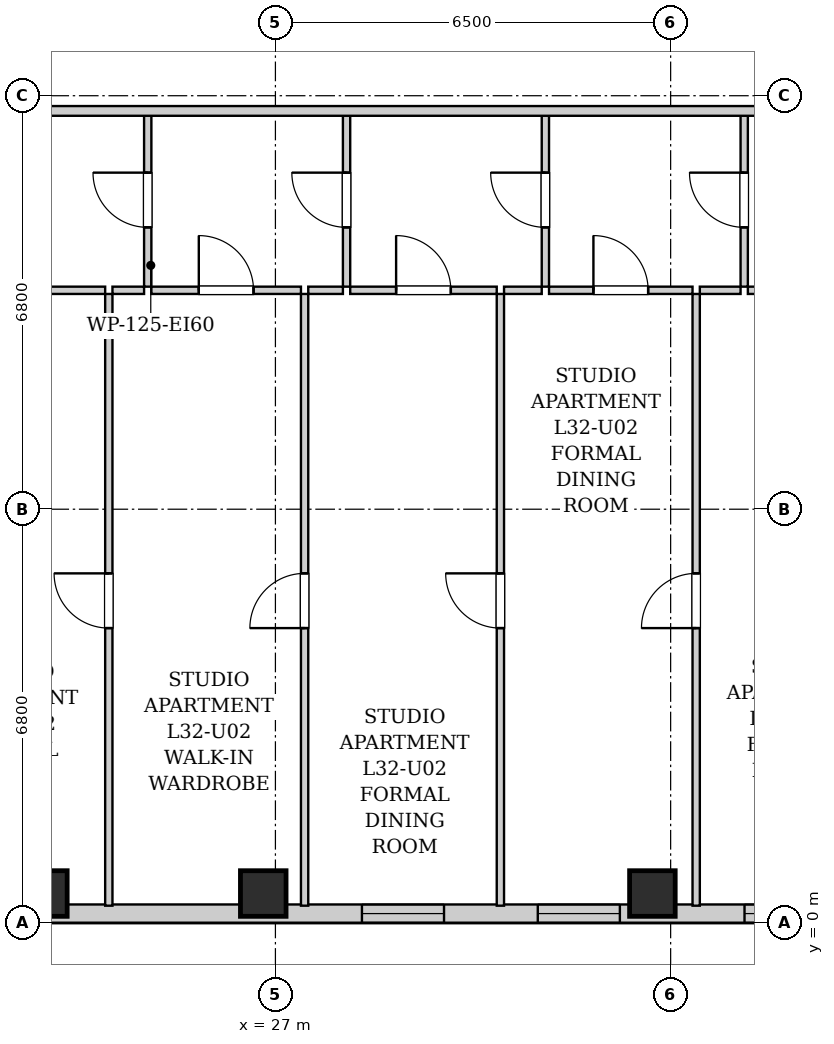
"""IFC4 building model, lengths in metres.
Left out: names, types, materials, properties, quantities, classifications, styles, units other than length and angle.
Written with IfcOpenShell. Run it as: python <this file> out.ifc"""

import sys

from ifc_helpers import new_model, si_unit, direction, frame, frame_2d, origin, origin_2d, place, context, subcontext, project, spatial, rectangle, extrude, element, fill, save


model = new_model("IFC4")
c1 = context("Model", 3, precision=1e-05, world=origin(), true_north=direction((0.0, 1.0)))
c2 = subcontext(c1, "Body", "Model", "MODEL_VIEW")
j1 = project(units=[si_unit("LENGTHUNIT", "METRE"), si_unit("PLANEANGLEUNIT", "RADIAN")], contexts=[c1])
p1 = place(None, origin())
s1 = spatial("IfcSite", under=j1, at=p1, CompositionType="ELEMENT")
p2 = place(p1, origin())
s2 = spatial("IfcBuilding", under=s1, at=p2, CompositionType="ELEMENT")
p3 = place(p2, frame((0.0, 0.0, 113.5)))
s3 = spatial("IfcBuildingStorey", under=s2, at=p3, CompositionType="ELEMENT", Elevation=113.5)
for number, where, z_axis, x_axis in (
    (1, (23.2, 0.48, 0.0), (0.0, 0.0, 1.0), (1.0, 0.0, 0.0)),
    (2, (26.8, 0.48, 0.0), (0.0, 0.0, 1.0), (1.0, 0.0, 0.0)),
    (3, (33.2, 0.48, 0.0), (0.0, 0.0, 1.0), (1.0, 0.0, 0.0)),
):
    element("IfcColumn", number, at=place(p3, frame(where, z_axis=z_axis, x_axis=x_axis)), inside=s3, PredefinedType="COLUMN", context=c2, shape_type="SweptSolid", body=[
        extrude(rectangle(XDim=0.75, YDim=0.75, at=origin_2d()), origin(), (0.0, 0.0, 1.0), 3.2),
    ])
p4 = place(p3, frame((40.9, 0.15, 0.0), z_axis=(0.0, 0.0, 1.0), x_axis=(-1.0, 0.0, 0.0)))
e4 = element("IfcWall", 4, at=p4, inside=s3, PredefinedType="SOLIDWALL", context=c2, shape_type="SweptSolid", body=[
    extrude(rectangle(XDim=21.95, YDim=0.3, at=frame_2d((10.975, 0.0))), origin(), (0.0, 0.0, 1.0), 2.94),
])
p5 = place(p4, frame((20.08, 0.0, 0.55)))
e5 = element("IfcOpeningElement", 5, at=p5, cuts=e4, PredefinedType="OPENING", context=c2, shape_type="SweptSolid", body=[
    extrude(rectangle(XDim=1.35, YDim=1.2, at=frame_2d((0.675, 0.6))), frame((0.0, 0.16, 0.0), z_axis=(0.0, -1.0, 0.0), x_axis=(1.0, 0.0, 0.0)), (0.0, 0.0, 1.0), 0.32),
])
p6 = place(p4, frame((18.4, 0.0, 0.55)))
e6 = element("IfcOpeningElement", 6, at=p6, cuts=e4, PredefinedType="OPENING", context=c2, shape_type="SweptSolid", body=[
    extrude(rectangle(XDim=0.85, YDim=1.2, at=frame_2d((0.425, 0.6))), frame((0.0, 0.16, 0.0), z_axis=(0.0, -1.0, 0.0), x_axis=(1.0, 0.0, 0.0)), (0.0, 0.0, 1.0), 0.32),
])
p7 = place(p4, frame((11.127, 0.0, 0.55)))
e7 = element("IfcOpeningElement", 7, at=p7, cuts=e4, PredefinedType="OPENING", context=c2, shape_type="SweptSolid", body=[
    extrude(rectangle(XDim=1.35, YDim=1.2, at=frame_2d((0.675, 0.6))), frame((0.0, 0.16, 0.0), z_axis=(0.0, -1.0, 0.0), x_axis=(1.0, 0.0, 0.0)), (0.0, 0.0, 1.0), 0.32),
])
p8 = place(p4, frame((8.235, 0.0, 0.55)))
e8 = element("IfcOpeningElement", 8, at=p8, cuts=e4, PredefinedType="OPENING", context=c2, shape_type="SweptSolid", body=[
    extrude(rectangle(XDim=1.35, YDim=1.2, at=frame_2d((0.675, 0.6))), frame((0.0, 0.16, 0.0), z_axis=(0.0, -1.0, 0.0), x_axis=(1.0, 0.0, 0.0)), (0.0, 0.0, 1.0), 0.32),
])
p9 = place(p4, frame((4.835, 0.0, 0.55)))
e9 = element("IfcOpeningElement", 9, at=p9, cuts=e4, PredefinedType="OPENING", context=c2, shape_type="SweptSolid", body=[
    extrude(rectangle(XDim=1.35, YDim=1.2, at=frame_2d((0.675, 0.6))), frame((0.0, 0.16, 0.0), z_axis=(0.0, -1.0, 0.0), x_axis=(1.0, 0.0, 0.0)), (0.0, 0.0, 1.0), 0.32),
])
p10 = place(p3, frame((24.9, 10.46, 0.0), z_axis=(0.0, 0.0, 1.0), x_axis=(0.0, 1.0, 0.0)))
e10 = element("IfcWall", 10, at=p10, inside=s3, PredefinedType="PARTITIONING", context=c2, shape_type="SweptSolid", body=[
    extrude(rectangle(XDim=2.85, YDim=0.12, at=frame_2d((1.425, 0.0))), origin(), (0.0, 0.0, 1.0), 2.94),
])
p11 = place(p10, frame((0.975, 0.0, 0.0)))
e11 = element("IfcOpeningElement", 11, at=p11, cuts=e10, PredefinedType="OPENING", context=c2, shape_type="SweptSolid", body=[
    extrude(rectangle(XDim=0.9, YDim=2.05, at=frame_2d((0.45, 1.025))), frame((0.0, 0.07, 0.0), z_axis=(0.0, -1.0, 0.0), x_axis=(1.0, 0.0, 0.0)), (0.0, 0.0, 1.0), 0.14),
])
p12 = place(p3, frame((21.1, 10.4, 0.0), z_axis=(0.0, 0.0, 1.0), x_axis=(1.0, 0.0, 0.0)))
e12 = element("IfcWall", 12, at=p12, inside=s3, PredefinedType="PARTITIONING", context=c2, shape_type="SweptSolid", body=[
    extrude(rectangle(XDim=3.1, YDim=0.12, at=frame_2d((1.55, 0.0))), origin(), (0.0, 0.0, 1.0), 2.94),
])
p13 = place(p12, frame((1.1, 0.0, 0.0)))
e13 = element("IfcOpeningElement", 13, at=p13, cuts=e12, PredefinedType="OPENING", context=c2, shape_type="SweptSolid", body=[
    extrude(rectangle(XDim=0.9, YDim=2.05, at=frame_2d((0.45, 1.025))), frame((0.0, 0.07, 0.0), z_axis=(0.0, -1.0, 0.0), x_axis=(1.0, 0.0, 0.0)), (0.0, 0.0, 1.0), 0.14),
])
p14 = place(p3, frame((24.32, 10.4, 0.0), z_axis=(0.0, 0.0, 1.0), x_axis=(1.0, 0.0, 0.0)))
e14 = element("IfcWall", 14, at=p14, inside=s3, PredefinedType="PARTITIONING", context=c2, shape_type="SweptSolid", body=[
    extrude(rectangle(XDim=0.52, YDim=0.12, at=frame_2d((0.26, 0.0))), origin(), (0.0, 0.0, 1.0), 2.94),
])
p15 = place(p3, frame((28.17, 10.46, 0.0), z_axis=(0.0, 0.0, 1.0), x_axis=(0.0, 1.0, 0.0)))
e15 = element("IfcWall", 15, at=p15, inside=s3, PredefinedType="PARTITIONING", context=c2, shape_type="SweptSolid", body=[
    extrude(rectangle(XDim=2.85, YDim=0.12, at=frame_2d((1.425, 0.0))), origin(), (0.0, 0.0, 1.0), 2.94),
])
p16 = place(p15, frame((0.975, 0.0, 0.0)))
e16 = element("IfcOpeningElement", 16, at=p16, cuts=e15, PredefinedType="OPENING", context=c2, shape_type="SweptSolid", body=[
    extrude(rectangle(XDim=0.9, YDim=2.05, at=frame_2d((0.45, 1.025))), frame((0.0, 0.07, 0.0), z_axis=(0.0, -1.0, 0.0), x_axis=(1.0, 0.0, 0.0)), (0.0, 0.0, 1.0), 0.14),
])
p17 = place(p3, frame((24.96, 10.4, 0.0), z_axis=(0.0, 0.0, 1.0), x_axis=(1.0, 0.0, 0.0)))
e17 = element("IfcWall", 17, at=p17, inside=s3, PredefinedType="PARTITIONING", context=c2, shape_type="SweptSolid", body=[
    extrude(rectangle(XDim=2.46, YDim=0.12, at=frame_2d((1.23, 0.0))), origin(), (0.0, 0.0, 1.0), 2.94),
])
p18 = place(p17, frame((0.78, 0.0, 0.0)))
e18 = element("IfcOpeningElement", 18, at=p18, cuts=e17, PredefinedType="OPENING", context=c2, shape_type="SweptSolid", body=[
    extrude(rectangle(XDim=0.9, YDim=2.05, at=frame_2d((0.45, 1.025))), frame((0.0, 0.07, 0.0), z_axis=(0.0, -1.0, 0.0), x_axis=(1.0, 0.0, 0.0)), (0.0, 0.0, 1.0), 0.14),
])
p19 = place(p3, frame((27.54, 10.4, 0.0), z_axis=(0.0, 0.0, 1.0), x_axis=(1.0, 0.0, 0.0)))
e19 = element("IfcWall", 19, at=p19, inside=s3, PredefinedType="PARTITIONING", context=c2, shape_type="SweptSolid", body=[
    extrude(rectangle(XDim=0.57, YDim=0.12, at=frame_2d((0.285, 0.0))), origin(), (0.0, 0.0, 1.0), 2.94),
])
p20 = place(p3, frame((31.44, 10.46, 0.0), z_axis=(0.0, 0.0, 1.0), x_axis=(0.0, 1.0, 0.0)))
e20 = element("IfcWall", 20, at=p20, inside=s3, PredefinedType="PARTITIONING", context=c2, shape_type="SweptSolid", body=[
    extrude(rectangle(XDim=2.85, YDim=0.12, at=frame_2d((1.425, 0.0))), origin(), (0.0, 0.0, 1.0), 2.94),
])
p21 = place(p20, frame((0.975, 0.0, 0.0)))
e21 = element("IfcOpeningElement", 21, at=p21, cuts=e20, PredefinedType="OPENING", context=c2, shape_type="SweptSolid", body=[
    extrude(rectangle(XDim=0.9, YDim=2.05, at=frame_2d((0.45, 1.025))), frame((0.0, 0.07, 0.0), z_axis=(0.0, -1.0, 0.0), x_axis=(1.0, 0.0, 0.0)), (0.0, 0.0, 1.0), 0.14),
])
p22 = place(p3, frame((28.23, 10.4, 0.0), z_axis=(0.0, 0.0, 1.0), x_axis=(1.0, 0.0, 0.0)))
e22 = element("IfcWall", 22, at=p22, inside=s3, PredefinedType="PARTITIONING", context=c2, shape_type="SweptSolid", body=[
    extrude(rectangle(XDim=2.41, YDim=0.12, at=frame_2d((1.205, 0.0))), origin(), (0.0, 0.0, 1.0), 2.94),
])
p23 = place(p22, frame((0.755, 0.0, 0.0)))
e23 = element("IfcOpeningElement", 23, at=p23, cuts=e22, PredefinedType="OPENING", context=c2, shape_type="SweptSolid", body=[
    extrude(rectangle(XDim=0.9, YDim=2.05, at=frame_2d((0.45, 1.025))), frame((0.0, 0.07, 0.0), z_axis=(0.0, -1.0, 0.0), x_axis=(1.0, 0.0, 0.0)), (0.0, 0.0, 1.0), 0.14),
])
p24 = place(p3, frame((30.76, 10.4, 0.0), z_axis=(0.0, 0.0, 1.0), x_axis=(1.0, 0.0, 0.0)))
e24 = element("IfcWall", 24, at=p24, inside=s3, PredefinedType="PARTITIONING", context=c2, shape_type="SweptSolid", body=[
    extrude(rectangle(XDim=0.62, YDim=0.12, at=frame_2d((0.31, 0.0))), origin(), (0.0, 0.0, 1.0), 2.94),
])
p25 = place(p3, frame((34.71, 10.46, 0.0), z_axis=(0.0, 0.0, 1.0), x_axis=(0.0, 1.0, 0.0)))
e25 = element("IfcWall", 25, at=p25, inside=s3, PredefinedType="PARTITIONING", context=c2, shape_type="SweptSolid", body=[
    extrude(rectangle(XDim=2.85, YDim=0.12, at=frame_2d((1.425, 0.0))), origin(), (0.0, 0.0, 1.0), 2.94),
])
p26 = place(p25, frame((0.975, 0.0, 0.0)))
e26 = element("IfcOpeningElement", 26, at=p26, cuts=e25, PredefinedType="OPENING", context=c2, shape_type="SweptSolid", body=[
    extrude(rectangle(XDim=0.9, YDim=2.05, at=frame_2d((0.45, 1.025))), frame((0.0, 0.07, 0.0), z_axis=(0.0, -1.0, 0.0), x_axis=(1.0, 0.0, 0.0)), (0.0, 0.0, 1.0), 0.14),
])
p27 = place(p3, frame((31.5, 10.4, 0.0), z_axis=(0.0, 0.0, 1.0), x_axis=(1.0, 0.0, 0.0)))
e27 = element("IfcWall", 27, at=p27, inside=s3, PredefinedType="PARTITIONING", context=c2, shape_type="SweptSolid", body=[
    extrude(rectangle(XDim=2.36, YDim=0.12, at=frame_2d((1.18, 0.0))), origin(), (0.0, 0.0, 1.0), 2.94),
])
p28 = place(p27, frame((0.73, 0.0, 0.0)))
e28 = element("IfcOpeningElement", 28, at=p28, cuts=e27, PredefinedType="OPENING", context=c2, shape_type="SweptSolid", body=[
    extrude(rectangle(XDim=0.9, YDim=2.05, at=frame_2d((0.45, 1.025))), frame((0.0, 0.07, 0.0), z_axis=(0.0, -1.0, 0.0), x_axis=(1.0, 0.0, 0.0)), (0.0, 0.0, 1.0), 0.14),
])
p29 = place(p3, frame((33.98, 10.4, 0.0), z_axis=(0.0, 0.0, 1.0), x_axis=(1.0, 0.0, 0.0)))
e29 = element("IfcWall", 29, at=p29, inside=s3, PredefinedType="PARTITIONING", context=c2, shape_type="SweptSolid", body=[
    extrude(rectangle(XDim=0.67, YDim=0.12, at=frame_2d((0.335, 0.0))), origin(), (0.0, 0.0, 1.0), 2.94),
])
p30 = place(p3, frame((34.77, 10.4, 0.0), z_axis=(0.0, 0.0, 1.0), x_axis=(1.0, 0.0, 0.0)))
e30 = element("IfcWall", 30, at=p30, inside=s3, PredefinedType="PARTITIONING", context=c2, shape_type="SweptSolid", body=[
    extrude(rectangle(XDim=2.31, YDim=0.12, at=frame_2d((1.155, 0.0))), origin(), (0.0, 0.0, 1.0), 2.94),
])
p31 = place(p30, frame((0.705, 0.0, 0.0)))
e31 = element("IfcOpeningElement", 31, at=p31, cuts=e30, PredefinedType="OPENING", context=c2, shape_type="SweptSolid", body=[
    extrude(rectangle(XDim=0.9, YDim=2.05, at=frame_2d((0.45, 1.025))), frame((0.0, 0.07, 0.0), z_axis=(0.0, -1.0, 0.0), x_axis=(1.0, 0.0, 0.0)), (0.0, 0.0, 1.0), 0.14),
])
p32 = place(p3, frame((24.26, 0.28, 0.0), z_axis=(0.0, 0.0, 1.0), x_axis=(0.0, 1.0, 0.0)))
e32 = element("IfcWall", 32, at=p32, inside=s3, PredefinedType="PARTITIONING", context=c2, shape_type="SweptSolid", body=[
    extrude(rectangle(XDim=10.06, YDim=0.12, at=frame_2d((5.03, 0.0))), origin(), (0.0, 0.0, 1.0), 2.94),
])
p33 = place(p32, frame((4.565, 0.0, 0.0)))
e33 = element("IfcOpeningElement", 33, at=p33, cuts=e32, PredefinedType="OPENING", context=c2, shape_type="SweptSolid", body=[
    extrude(rectangle(XDim=0.9, YDim=2.05, at=frame_2d((0.45, 1.025))), frame((0.0, 0.07, 0.0), z_axis=(0.0, -1.0, 0.0), x_axis=(1.0, 0.0, 0.0)), (0.0, 0.0, 1.0), 0.14),
])
p34 = place(p3, frame((27.48, 0.28, 0.0), z_axis=(0.0, 0.0, 1.0), x_axis=(0.0, 1.0, 0.0)))
e34 = element("IfcWall", 34, at=p34, inside=s3, PredefinedType="PARTITIONING", context=c2, shape_type="SweptSolid", body=[
    extrude(rectangle(XDim=10.06, YDim=0.12, at=frame_2d((5.03, 0.0))), origin(), (0.0, 0.0, 1.0), 2.94),
])
p35 = place(p34, frame((4.565, 0.0, 0.0)))
e35 = element("IfcOpeningElement", 35, at=p35, cuts=e34, PredefinedType="OPENING", context=c2, shape_type="SweptSolid", body=[
    extrude(rectangle(XDim=0.9, YDim=2.05, at=frame_2d((0.45, 1.025))), frame((0.0, 0.07, 0.0), z_axis=(0.0, -1.0, 0.0), x_axis=(1.0, 0.0, 0.0)), (0.0, 0.0, 1.0), 0.14),
])
p36 = place(p3, frame((30.7, 0.28, 0.0), z_axis=(0.0, 0.0, 1.0), x_axis=(0.0, 1.0, 0.0)))
e36 = element("IfcWall", 36, at=p36, inside=s3, PredefinedType="PARTITIONING", context=c2, shape_type="SweptSolid", body=[
    extrude(rectangle(XDim=10.06, YDim=0.12, at=frame_2d((5.03, 0.0))), origin(), (0.0, 0.0, 1.0), 2.94),
])
p37 = place(p36, frame((4.565, 0.0, 0.0)))
e37 = element("IfcOpeningElement", 37, at=p37, cuts=e36, PredefinedType="OPENING", context=c2, shape_type="SweptSolid", body=[
    extrude(rectangle(XDim=0.9, YDim=2.05, at=frame_2d((0.45, 1.025))), frame((0.0, 0.07, 0.0), z_axis=(0.0, -1.0, 0.0), x_axis=(1.0, 0.0, 0.0)), (0.0, 0.0, 1.0), 0.14),
])
p38 = place(p3, frame((33.92, 0.28, 0.0), z_axis=(0.0, 0.0, 1.0), x_axis=(0.0, 1.0, 0.0)))
e38 = element("IfcWall", 38, at=p38, inside=s3, PredefinedType="PARTITIONING", context=c2, shape_type="SweptSolid", body=[
    extrude(rectangle(XDim=10.06, YDim=0.12, at=frame_2d((5.03, 0.0))), origin(), (0.0, 0.0, 1.0), 2.94),
])
p39 = place(p38, frame((4.565, 0.0, 0.0)))
e39 = element("IfcOpeningElement", 39, at=p39, cuts=e38, PredefinedType="OPENING", context=c2, shape_type="SweptSolid", body=[
    extrude(rectangle(XDim=0.9, YDim=2.05, at=frame_2d((0.45, 1.025))), frame((0.0, 0.07, 0.0), z_axis=(0.0, -1.0, 0.0), x_axis=(1.0, 0.0, 0.0)), (0.0, 0.0, 1.0), 0.14),
])
p40 = place(p3, frame((10.05, 13.35, 0.0), z_axis=(0.0, 0.0, 1.0), x_axis=(1.0, 0.0, 0.0)))
e40 = element("IfcWall", 40, at=p40, inside=s3, PredefinedType="PARTITIONING", context=c2, shape_type="SweptSolid", body=[
    extrude(rectangle(XDim=30.8, YDim=0.16, at=frame_2d((15.4, 0.0))), origin(), (0.0, 0.0, 1.0), 2.94),
])
p41 = place(p40, frame((3.692, 0.0, 0.0)))
e41 = element("IfcOpeningElement", 41, at=p41, cuts=e40, PredefinedType="OPENING", context=c2, shape_type="SweptSolid", body=[
    extrude(rectangle(XDim=0.95, YDim=2.1, at=frame_2d((0.475, 1.05))), frame((0.0, 0.09, 0.0), z_axis=(0.0, -1.0, 0.0), x_axis=(1.0, 0.0, 0.0)), (0.0, 0.0, 1.0), 0.18),
])
p42 = place(p40, frame((12.095, 0.0, 0.0)))
e42 = element("IfcOpeningElement", 42, at=p42, cuts=e40, PredefinedType="OPENING", context=c2, shape_type="SweptSolid", body=[
    extrude(rectangle(XDim=0.95, YDim=2.1, at=frame_2d((0.475, 1.05))), frame((0.0, 0.09, 0.0), z_axis=(0.0, -1.0, 0.0), x_axis=(1.0, 0.0, 0.0)), (0.0, 0.0, 1.0), 0.18),
])
p43 = place(p11, origin())
e43 = element("IfcDoor", 43, at=p43, inside=s3, OperationType="SINGLE_SWING_RIGHT", PredefinedType="DOOR", context=c2, shape_type="SweptSolid", body=[
    extrude(rectangle(XDim=0.9, YDim=2.05, at=frame_2d((0.45, 1.025))), frame((0.0, 0.025, 0.0), z_axis=(0.0, -1.0, 0.0), x_axis=(1.0, 0.0, 0.0)), (0.0, 0.0, 1.0), 0.05),
])
fill(e11, e43)
p44 = place(p16, origin())
e44 = element("IfcDoor", 44, at=p44, inside=s3, OperationType="SINGLE_SWING_RIGHT", PredefinedType="DOOR", context=c2, shape_type="SweptSolid", body=[
    extrude(rectangle(XDim=0.9, YDim=2.05, at=frame_2d((0.45, 1.025))), frame((0.0, 0.025, 0.0), z_axis=(0.0, -1.0, 0.0), x_axis=(1.0, 0.0, 0.0)), (0.0, 0.0, 1.0), 0.05),
])
fill(e16, e44)
p45 = place(p18, origin())
e45 = element("IfcDoor", 45, at=p45, inside=s3, OperationType="SINGLE_SWING_LEFT", PredefinedType="DOOR", context=c2, shape_type="SweptSolid", body=[
    extrude(rectangle(XDim=0.9, YDim=2.05, at=frame_2d((0.45, 1.025))), frame((0.0, 0.025, 0.0), z_axis=(0.0, -1.0, 0.0), x_axis=(1.0, 0.0, 0.0)), (0.0, 0.0, 1.0), 0.05),
])
fill(e18, e45)
p46 = place(p21, origin())
e46 = element("IfcDoor", 46, at=p46, inside=s3, OperationType="SINGLE_SWING_RIGHT", PredefinedType="DOOR", context=c2, shape_type="SweptSolid", body=[
    extrude(rectangle(XDim=0.9, YDim=2.05, at=frame_2d((0.45, 1.025))), frame((0.0, 0.025, 0.0), z_axis=(0.0, -1.0, 0.0), x_axis=(1.0, 0.0, 0.0)), (0.0, 0.0, 1.0), 0.05),
])
fill(e21, e46)
p47 = place(p23, origin())
e47 = element("IfcDoor", 47, at=p47, inside=s3, OperationType="SINGLE_SWING_LEFT", PredefinedType="DOOR", context=c2, shape_type="SweptSolid", body=[
    extrude(rectangle(XDim=0.9, YDim=2.05, at=frame_2d((0.45, 1.025))), frame((0.0, 0.025, 0.0), z_axis=(0.0, -1.0, 0.0), x_axis=(1.0, 0.0, 0.0)), (0.0, 0.0, 1.0), 0.05),
])
fill(e23, e47)
p48 = place(p26, origin())
e48 = element("IfcDoor", 48, at=p48, inside=s3, OperationType="SINGLE_SWING_RIGHT", PredefinedType="DOOR", context=c2, shape_type="SweptSolid", body=[
    extrude(rectangle(XDim=0.9, YDim=2.05, at=frame_2d((0.45, 1.025))), frame((0.0, 0.025, 0.0), z_axis=(0.0, -1.0, 0.0), x_axis=(1.0, 0.0, 0.0)), (0.0, 0.0, 1.0), 0.05),
])
fill(e26, e48)
p49 = place(p28, origin())
e49 = element("IfcDoor", 49, at=p49, inside=s3, OperationType="SINGLE_SWING_LEFT", PredefinedType="DOOR", context=c2, shape_type="SweptSolid", body=[
    extrude(rectangle(XDim=0.9, YDim=2.05, at=frame_2d((0.45, 1.025))), frame((0.0, 0.025, 0.0), z_axis=(0.0, -1.0, 0.0), x_axis=(1.0, 0.0, 0.0)), (0.0, 0.0, 1.0), 0.05),
])
fill(e28, e49)
p50 = place(p33, origin())
e50 = element("IfcDoor", 50, at=p50, inside=s3, OperationType="SINGLE_SWING_RIGHT", PredefinedType="DOOR", context=c2, shape_type="SweptSolid", body=[
    extrude(rectangle(XDim=0.9, YDim=2.05, at=frame_2d((0.45, 1.025))), frame((0.0, 0.025, 0.0), z_axis=(0.0, -1.0, 0.0), x_axis=(1.0, 0.0, 0.0)), (0.0, 0.0, 1.0), 0.05),
])
fill(e33, e50)
p51 = place(p35, origin())
e51 = element("IfcDoor", 51, at=p51, inside=s3, OperationType="SINGLE_SWING_LEFT", PredefinedType="DOOR", context=c2, shape_type="SweptSolid", body=[
    extrude(rectangle(XDim=0.9, YDim=2.05, at=frame_2d((0.45, 1.025))), frame((0.0, 0.025, 0.0), z_axis=(0.0, -1.0, 0.0), x_axis=(1.0, 0.0, 0.0)), (0.0, 0.0, 1.0), 0.05),
])
fill(e35, e51)
p52 = place(p37, origin())
e52 = element("IfcDoor", 52, at=p52, inside=s3, OperationType="SINGLE_SWING_RIGHT", PredefinedType="DOOR", context=c2, shape_type="SweptSolid", body=[
    extrude(rectangle(XDim=0.9, YDim=2.05, at=frame_2d((0.45, 1.025))), frame((0.0, 0.025, 0.0), z_axis=(0.0, -1.0, 0.0), x_axis=(1.0, 0.0, 0.0)), (0.0, 0.0, 1.0), 0.05),
])
fill(e37, e52)
p53 = place(p39, origin())
e53 = element("IfcDoor", 53, at=p53, inside=s3, OperationType="SINGLE_SWING_LEFT", PredefinedType="DOOR", context=c2, shape_type="SweptSolid", body=[
    extrude(rectangle(XDim=0.9, YDim=2.05, at=frame_2d((0.45, 1.025))), frame((0.0, 0.025, 0.0), z_axis=(0.0, -1.0, 0.0), x_axis=(1.0, 0.0, 0.0)), (0.0, 0.0, 1.0), 0.05),
])
fill(e39, e53)
p54 = place(p7, origin())
e54 = element("IfcWindow", 54, at=p54, inside=s3, PartitioningType="SINGLE_PANEL", PredefinedType="WINDOW", context=c2, shape_type="SweptSolid", body=[
    extrude(rectangle(XDim=1.35, YDim=1.2, at=frame_2d((0.675, 0.6))), frame((0.0, 0.03, 0.0), z_axis=(0.0, -1.0, 0.0), x_axis=(1.0, 0.0, 0.0)), (0.0, 0.0, 1.0), 0.06),
])
fill(e7, e54)
p55 = place(p8, origin())
e55 = element("IfcWindow", 55, at=p55, inside=s3, PartitioningType="SINGLE_PANEL", PredefinedType="WINDOW", context=c2, shape_type="SweptSolid", body=[
    extrude(rectangle(XDim=1.35, YDim=1.2, at=frame_2d((0.675, 0.6))), frame((0.0, 0.03, 0.0), z_axis=(0.0, -1.0, 0.0), x_axis=(1.0, 0.0, 0.0)), (0.0, 0.0, 1.0), 0.06),
])
fill(e8, e55)
p56 = place(p9, origin())
e56 = element("IfcWindow", 56, at=p56, inside=s3, PartitioningType="SINGLE_PANEL", PredefinedType="WINDOW", context=c2, shape_type="SweptSolid", body=[
    extrude(rectangle(XDim=1.35, YDim=1.2, at=frame_2d((0.675, 0.6))), frame((0.0, 0.03, 0.0), z_axis=(0.0, -1.0, 0.0), x_axis=(1.0, 0.0, 0.0)), (0.0, 0.0, 1.0), 0.06),
])
fill(e9, e56)
save(model, sys.argv[1])
